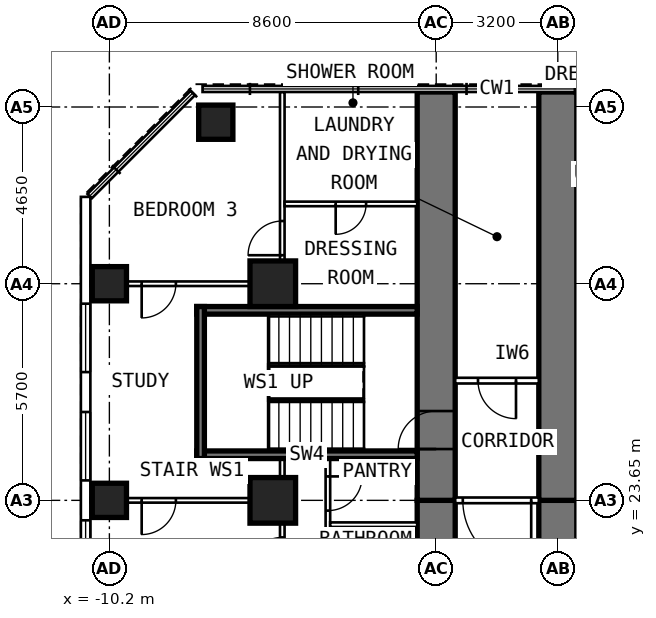
"""IFC4 building model, lengths in metres.
Left out: names, types, materials, properties, quantities, classifications, styles, units other than length and angle.
Written with IfcOpenShell. Run it as: python <this file> out.ifc"""

import sys

from ifc_helpers import new_model, si_unit, direction, frame, frame_2d, origin, origin_2d, place, context, subcontext, project, spatial, rectangle, extrude, element, fill, save


model = new_model("IFC4")
c1 = context("Model", 3, precision=1e-05, world=origin(), true_north=direction((0.0, 1.0)))
c2 = subcontext(c1, "Body", "Model", "MODEL_VIEW")
j1 = project(units=[si_unit("LENGTHUNIT", "METRE"), si_unit("PLANEANGLEUNIT", "RADIAN")], contexts=[c1])
p1 = place(None, origin())
s1 = spatial("IfcSite", under=j1, at=p1, CompositionType="ELEMENT")
p2 = place(p1, origin())
s2 = spatial("IfcBuilding", under=s1, at=p2, CompositionType="ELEMENT")
p3 = place(p2, frame((0.0, 0.0, 91.6)))
s3 = spatial("IfcBuildingStorey", under=s2, at=p3, CompositionType="ELEMENT", Elevation=91.6)
for number, where, z_axis, x_axis in (
    (1, (-10.2, 23.65, 0.0), (0.0, 0.0, 1.0), (0.0, 1.0, 0.0)),
    (2, (-10.2, 29.35, 0.0), (0.0, 0.0, 1.0), (0.0, 1.0, 0.0)),
    (3, (-7.4, 33.6, 0.0), (0.0, 0.0, 1.0), (0.0, 1.0, 0.0)),
):
    element("IfcColumn", number, at=place(p3, frame(where, z_axis=z_axis, x_axis=x_axis)), inside=s3, PredefinedType="COLUMN", context=c2, shape_type="SweptSolid", body=[
        extrude(rectangle(XDim=0.9, YDim=0.9, at=origin_2d()), origin(), (0.0, 0.0, 1.0), 3.6),
    ])
for number, where, z_axis, x_axis in (
    (4, (-5.9, 23.65, 0.0), (0.0, 0.0, 1.0), (0.0, 1.0, 0.0)),
    (5, (-5.9, 29.35, 0.0), (0.0, 0.0, 1.0), (0.0, 1.0, 0.0)),
):
    element("IfcColumn", number, at=place(p3, frame(where, z_axis=z_axis, x_axis=x_axis)), inside=s3, PredefinedType="COLUMN", context=c2, shape_type="SweptSolid", body=[
        extrude(rectangle(XDim=1.2, YDim=1.2, at=origin_2d()), origin(), (0.0, 0.0, 1.0), 3.6),
    ])
p4 = place(p3, frame((-1.6, 17.95, 0.0), z_axis=(0.0, 0.0, 1.0), x_axis=(0.0, 1.0, 0.0)))
e6 = element("IfcWall", 6, at=p4, inside=s3, PredefinedType="SHEAR", context=c2, shape_type="SweptSolid", body=[
    extrude(rectangle(XDim=5.7, YDim=1.0, at=frame_2d((2.85, 0.0))), origin(), (0.0, 0.0, 1.0), 3.6),
])
p5 = place(p4, frame((0.9, 0.0, 0.0)))
e7 = element("IfcOpeningElement", 7, at=p5, cuts=e6, PredefinedType="OPENING", context=c2, shape_type="SweptSolid", body=[
    extrude(rectangle(XDim=1.0, YDim=2.1, at=frame_2d((0.5, 1.05))), frame((0.0, 0.512, 0.0), z_axis=(0.0, -1.0, 0.0), x_axis=(1.0, 0.0, 0.0)), (0.0, 0.0, 1.0), 1.024),
])
p6 = place(p3, frame((-1.6, 23.65, 0.0), z_axis=(0.0, 0.0, 1.0), x_axis=(0.0, 1.0, 0.0)))
e8 = element("IfcWall", 8, at=p6, inside=s3, PredefinedType="SHEAR", context=c2, shape_type="SweptSolid", body=[
    extrude(rectangle(XDim=10.745, YDim=1.0, at=frame_2d((5.373, 0.0))), origin(), (0.0, 0.0, 1.0), 3.6),
])
p7 = place(p6, frame((1.35, 0.0, 0.0)))
e9 = element("IfcOpeningElement", 9, at=p7, cuts=e8, PredefinedType="OPENING", context=c2, shape_type="SweptSolid", body=[
    extrude(rectangle(XDim=1.0, YDim=2.1, at=frame_2d((0.5, 1.05))), frame((0.0, 0.512, 0.0), z_axis=(0.0, -1.0, 0.0), x_axis=(1.0, 0.0, 0.0)), (0.0, 0.0, 1.0), 1.024),
])
p8 = place(p3, frame((1.6, 17.95, 0.0), z_axis=(0.0, 0.0, 1.0), x_axis=(0.0, 1.0, 0.0)))
e10 = element("IfcWall", 10, at=p8, inside=s3, PredefinedType="SHEAR", context=c2, shape_type="SweptSolid", body=[
    extrude(rectangle(XDim=5.7, YDim=1.0, at=frame_2d((2.85, 0.0))), origin(), (0.0, 0.0, 1.0), 3.6),
])
p9 = place(p8, frame((0.9, 0.0, 0.0)))
e11 = element("IfcOpeningElement", 11, at=p9, cuts=e10, PredefinedType="OPENING", context=c2, shape_type="SweptSolid", body=[
    extrude(rectangle(XDim=1.0, YDim=2.1, at=frame_2d((0.5, 1.05))), frame((0.0, 0.512, 0.0), z_axis=(0.0, -1.0, 0.0), x_axis=(1.0, 0.0, 0.0)), (0.0, 0.0, 1.0), 1.024),
])
p10 = place(p3, frame((1.6, 23.65, 0.0), z_axis=(0.0, 0.0, 1.0), x_axis=(0.0, 1.0, 0.0)))
e12 = element("IfcWall", 12, at=p10, inside=s3, PredefinedType="SHEAR", context=c2, shape_type="SweptSolid", body=[
    extrude(rectangle(XDim=10.745, YDim=1.0, at=frame_2d((5.373, 0.0))), origin(), (0.0, 0.0, 1.0), 3.6),
])
p11 = place(p3, frame((-10.825, 6.148, 0.0), z_axis=(0.0, 0.0, 1.0), x_axis=(0.0, 1.0, 0.0)))
e13 = element("IfcWall", 13, at=p11, inside=s3, PredefinedType="SOLIDWALL", context=c2, shape_type="SweptSolid", body=[
    extrude(rectangle(XDim=25.487, YDim=0.25, at=frame_2d((12.744, 0.0))), origin(), (0.0, 0.0, 1.0), 3.35),
])
p12 = place(p11, frame((0.927, 0.0, 0.8)))
e14 = element("IfcOpeningElement", 14, at=p12, cuts=e13, PredefinedType="OPENING", context=c2, shape_type="SweptSolid", body=[
    extrude(rectangle(XDim=1.8, YDim=1.8, at=frame_2d((0.9, 0.9))), frame((0.0, 0.137, 0.0), z_axis=(0.0, -1.0, 0.0), x_axis=(1.0, 0.0, 0.0)), (0.0, 0.0, 1.0), 0.274),
])
p13 = place(p11, frame((3.777, 0.0, 0.8)))
e15 = element("IfcOpeningElement", 15, at=p13, cuts=e13, PredefinedType="OPENING", context=c2, shape_type="SweptSolid", body=[
    extrude(rectangle(XDim=1.8, YDim=1.8, at=frame_2d((0.9, 0.9))), frame((0.0, 0.137, 0.0), z_axis=(0.0, -1.0, 0.0), x_axis=(1.0, 0.0, 0.0)), (0.0, 0.0, 1.0), 0.274),
])
p14 = place(p11, frame((6.627, 0.0, 0.8)))
e16 = element("IfcOpeningElement", 16, at=p14, cuts=e13, PredefinedType="OPENING", context=c2, shape_type="SweptSolid", body=[
    extrude(rectangle(XDim=1.8, YDim=1.8, at=frame_2d((0.9, 0.9))), frame((0.0, 0.137, 0.0), z_axis=(0.0, -1.0, 0.0), x_axis=(1.0, 0.0, 0.0)), (0.0, 0.0, 1.0), 0.274),
])
p15 = place(p11, frame((9.477, 0.0, 0.8)))
e17 = element("IfcOpeningElement", 17, at=p15, cuts=e13, PredefinedType="OPENING", context=c2, shape_type="SweptSolid", body=[
    extrude(rectangle(XDim=1.8, YDim=1.8, at=frame_2d((0.9, 0.9))), frame((0.0, 0.137, 0.0), z_axis=(0.0, -1.0, 0.0), x_axis=(1.0, 0.0, 0.0)), (0.0, 0.0, 1.0), 0.274),
])
p16 = place(p11, frame((12.327, 0.0, 0.8)))
e18 = element("IfcOpeningElement", 18, at=p16, cuts=e13, PredefinedType="OPENING", context=c2, shape_type="SweptSolid", body=[
    extrude(rectangle(XDim=1.8, YDim=1.8, at=frame_2d((0.9, 0.9))), frame((0.0, 0.137, 0.0), z_axis=(0.0, -1.0, 0.0), x_axis=(1.0, 0.0, 0.0)), (0.0, 0.0, 1.0), 0.274),
])
p17 = place(p11, frame((15.177, 0.0, 0.8)))
e19 = element("IfcOpeningElement", 19, at=p17, cuts=e13, PredefinedType="OPENING", context=c2, shape_type="SweptSolid", body=[
    extrude(rectangle(XDim=1.8, YDim=1.8, at=frame_2d((0.9, 0.9))), frame((0.0, 0.137, 0.0), z_axis=(0.0, -1.0, 0.0), x_axis=(1.0, 0.0, 0.0)), (0.0, 0.0, 1.0), 0.274),
])
p18 = place(p11, frame((18.027, 0.0, 0.8)))
e20 = element("IfcOpeningElement", 20, at=p18, cuts=e13, PredefinedType="OPENING", context=c2, shape_type="SweptSolid", body=[
    extrude(rectangle(XDim=1.8, YDim=1.8, at=frame_2d((0.9, 0.9))), frame((0.0, 0.137, 0.0), z_axis=(0.0, -1.0, 0.0), x_axis=(1.0, 0.0, 0.0)), (0.0, 0.0, 1.0), 0.274),
])
p19 = place(p11, frame((20.877, 0.0, 0.8)))
e21 = element("IfcOpeningElement", 21, at=p19, cuts=e13, PredefinedType="OPENING", context=c2, shape_type="SweptSolid", body=[
    extrude(rectangle(XDim=1.8, YDim=1.8, at=frame_2d((0.9, 0.9))), frame((0.0, 0.137, 0.0), z_axis=(0.0, -1.0, 0.0), x_axis=(1.0, 0.0, 0.0)), (0.0, 0.0, 1.0), 0.274),
])
p20 = place(p3, frame((-4.45, 15.2, 0.0), z_axis=(0.0, 0.0, 1.0), x_axis=(0.0, 1.0, 0.0)))
e22 = element("IfcWall", 22, at=p20, inside=s3, PredefinedType="PARTITIONING", context=c2, shape_type="SweptSolid", body=[
    extrude(rectangle(XDim=9.55, YDim=0.12, at=frame_2d((4.775, 0.0))), origin(), (0.0, 0.0, 1.0), 3.35),
])
p21 = place(p20, frame((0.312, 0.0, 0.0)))
e23 = element("IfcOpeningElement", 23, at=p21, cuts=e22, PredefinedType="OPENING", context=c2, shape_type="SweptSolid", body=[
    extrude(rectangle(XDim=0.8, YDim=2.1, at=frame_2d((0.4, 1.05))), frame((0.0, 0.072, 0.0), z_axis=(0.0, -1.0, 0.0), x_axis=(1.0, 0.0, 0.0)), (0.0, 0.0, 1.0), 0.144),
])
p22 = place(p20, frame((1.938, 0.0, 0.0)))
e24 = element("IfcOpeningElement", 24, at=p22, cuts=e22, PredefinedType="OPENING", context=c2, shape_type="SweptSolid", body=[
    extrude(rectangle(XDim=0.8, YDim=2.1, at=frame_2d((0.4, 1.05))), frame((0.0, 0.072, 0.0), z_axis=(0.0, -1.0, 0.0), x_axis=(1.0, 0.0, 0.0)), (0.0, 0.0, 1.0), 0.144),
])
p23 = place(p20, frame((3.8, 0.0, 0.0)))
e25 = element("IfcOpeningElement", 25, at=p23, cuts=e22, PredefinedType="OPENING", context=c2, shape_type="SweptSolid", body=[
    extrude(rectangle(XDim=0.9, YDim=2.1, at=frame_2d((0.45, 1.05))), frame((0.0, 0.072, 0.0), z_axis=(0.0, -1.0, 0.0), x_axis=(1.0, 0.0, 0.0)), (0.0, 0.0, 1.0), 0.144),
])
p24 = place(p20, frame((6.18, 0.0, 0.0)))
e26 = element("IfcOpeningElement", 26, at=p24, cuts=e22, PredefinedType="OPENING", context=c2, shape_type="SweptSolid", body=[
    extrude(rectangle(XDim=0.8, YDim=2.1, at=frame_2d((0.4, 1.05))), frame((0.0, 0.072, 0.0), z_axis=(0.0, -1.0, 0.0), x_axis=(1.0, 0.0, 0.0)), (0.0, 0.0, 1.0), 0.144),
])
p25 = place(p20, frame((8.18, 0.0, 0.0)))
e27 = element("IfcOpeningElement", 27, at=p25, cuts=e22, PredefinedType="OPENING", context=c2, shape_type="SweptSolid", body=[
    extrude(rectangle(XDim=0.9, YDim=2.1, at=frame_2d((0.45, 1.05))), frame((0.0, 0.072, 0.0), z_axis=(0.0, -1.0, 0.0), x_axis=(1.0, 0.0, 0.0)), (0.0, 0.0, 1.0), 0.144),
])
p26 = place(p3, frame((-5.65, 15.2, 0.0), z_axis=(0.0, 0.0, 1.0), x_axis=(0.0, 1.0, 0.0)))
e28 = element("IfcWall", 28, at=p26, inside=s3, PredefinedType="PARTITIONING", context=c2, shape_type="SweptSolid", body=[
    extrude(rectangle(XDim=9.55, YDim=0.12, at=frame_2d((4.775, 0.0))), origin(), (0.0, 0.0, 1.0), 3.35),
])
p27 = place(p26, frame((0.875, 0.0, 0.0)))
e29 = element("IfcOpeningElement", 29, at=p27, cuts=e28, PredefinedType="OPENING", context=c2, shape_type="SweptSolid", body=[
    extrude(rectangle(XDim=0.9, YDim=2.1, at=frame_2d((0.45, 1.05))), frame((0.0, 0.072, 0.0), z_axis=(0.0, -1.0, 0.0), x_axis=(1.0, 0.0, 0.0)), (0.0, 0.0, 1.0), 0.144),
])
p28 = place(p26, frame((3.725, 0.0, 0.0)))
e30 = element("IfcOpeningElement", 30, at=p28, cuts=e28, PredefinedType="OPENING", context=c2, shape_type="SweptSolid", body=[
    extrude(rectangle(XDim=0.9, YDim=2.1, at=frame_2d((0.45, 1.05))), frame((0.0, 0.072, 0.0), z_axis=(0.0, -1.0, 0.0), x_axis=(1.0, 0.0, 0.0)), (0.0, 0.0, 1.0), 0.144),
])
p29 = place(p26, frame((6.575, 0.0, 0.0)))
e31 = element("IfcOpeningElement", 31, at=p29, cuts=e28, PredefinedType="OPENING", context=c2, shape_type="SweptSolid", body=[
    extrude(rectangle(XDim=0.9, YDim=2.1, at=frame_2d((0.45, 1.05))), frame((0.0, 0.072, 0.0), z_axis=(0.0, -1.0, 0.0), x_axis=(1.0, 0.0, 0.0)), (0.0, 0.0, 1.0), 0.144),
])
p30 = place(p3, frame((-2.1, 23.01, 0.0), z_axis=(0.0, 0.0, 1.0), x_axis=(-1.0, 0.0, 0.0)))
e32 = element("IfcWall", 32, at=p30, inside=s3, PredefinedType="PARTITIONING", context=c2, shape_type="SweptSolid", body=[
    extrude(rectangle(XDim=2.29, YDim=0.12, at=frame_2d((1.145, 0.0))), origin(), (0.0, 0.0, 1.0), 3.35),
])
p31 = place(p3, frame((-5.71, 23.65, 0.0), z_axis=(0.0, 0.0, 1.0), x_axis=(-1.0, 0.0, 0.0)))
e33 = element("IfcWall", 33, at=p31, inside=s3, PredefinedType="PARTITIONING", context=c2, shape_type="SweptSolid", body=[
    extrude(rectangle(XDim=4.99, YDim=0.12, at=frame_2d((2.495, 0.0))), origin(), (0.0, 0.0, 1.0), 2.45),
])
p32 = place(p31, frame((2.74, 0.0, 0.0)))
e34 = element("IfcOpeningElement", 34, at=p32, cuts=e33, PredefinedType="OPENING", context=c2, shape_type="SweptSolid", body=[
    extrude(rectangle(XDim=0.9, YDim=2.1, at=frame_2d((0.45, 1.05))), frame((0.0, 0.072, 0.0), z_axis=(0.0, -1.0, 0.0), x_axis=(1.0, 0.0, 0.0)), (0.0, 0.0, 1.0), 0.144),
])
p33 = place(p3, frame((-5.71, 29.35, 0.0), z_axis=(0.0, 0.0, 1.0), x_axis=(-1.0, 0.0, 0.0)))
e35 = element("IfcWall", 35, at=p33, inside=s3, PredefinedType="PARTITIONING", context=c2, shape_type="SweptSolid", body=[
    extrude(rectangle(XDim=4.99, YDim=0.12, at=frame_2d((2.495, 0.0))), origin(), (0.0, 0.0, 1.0), 2.45),
])
p34 = place(p33, frame((2.74, 0.0, 0.0)))
e36 = element("IfcOpeningElement", 36, at=p34, cuts=e35, PredefinedType="OPENING", context=c2, shape_type="SweptSolid", body=[
    extrude(rectangle(XDim=0.9, YDim=2.1, at=frame_2d((0.45, 1.05))), frame((0.0, 0.072, 0.0), z_axis=(0.0, -1.0, 0.0), x_axis=(1.0, 0.0, 0.0)), (0.0, 0.0, 1.0), 0.144),
])
p35 = place(p3, frame((-5.65, 28.95, 0.0), z_axis=(0.0, 0.0, 1.0), x_axis=(0.0, 1.0, 0.0)))
e37 = element("IfcWall", 37, at=p35, inside=s3, PredefinedType="PARTITIONING", context=c2, shape_type="SweptSolid", body=[
    extrude(rectangle(XDim=5.445, YDim=0.12, at=frame_2d((2.723, 0.0))), origin(), (0.0, 0.0, 1.0), 3.35),
])
p36 = place(p35, frame((1.15, 0.0, 0.0)))
e38 = element("IfcOpeningElement", 38, at=p36, cuts=e37, PredefinedType="OPENING", context=c2, shape_type="SweptSolid", body=[
    extrude(rectangle(XDim=0.9, YDim=2.1, at=frame_2d((0.45, 1.05))), frame((0.0, 0.072, 0.0), z_axis=(0.0, -1.0, 0.0), x_axis=(1.0, 0.0, 0.0)), (0.0, 0.0, 1.0), 0.144),
])
p37 = place(p3, frame((-2.1, 31.45, 0.0), z_axis=(0.0, 0.0, 1.0), x_axis=(-1.0, 0.0, 0.0)))
e39 = element("IfcWall", 39, at=p37, inside=s3, PredefinedType="PARTITIONING", context=c2, shape_type="SweptSolid", body=[
    extrude(rectangle(XDim=3.49, YDim=0.12, at=frame_2d((1.745, 0.0))), origin(), (0.0, 0.0, 1.0), 3.35),
])
p38 = place(p37, frame((1.345, 0.0, 0.0)))
e40 = element("IfcOpeningElement", 40, at=p38, cuts=e39, PredefinedType="OPENING", context=c2, shape_type="SweptSolid", body=[
    extrude(rectangle(XDim=0.8, YDim=2.1, at=frame_2d((0.4, 1.05))), frame((0.0, 0.072, 0.0), z_axis=(0.0, -1.0, 0.0), x_axis=(1.0, 0.0, 0.0)), (0.0, 0.0, 1.0), 0.144),
])
p39 = place(p3, frame((1.1, 26.8, 0.0), z_axis=(0.0, 0.0, 1.0), x_axis=(-1.0, 0.0, 0.0)))
e41 = element("IfcWall", 41, at=p39, inside=s3, PredefinedType="PARTITIONING", context=c2, shape_type="SweptSolid", body=[
    extrude(rectangle(XDim=2.2, YDim=0.15, at=frame_2d((1.1, 0.0))), origin(), (0.0, 0.0, 1.0), 3.35),
])
p40 = place(p39, frame((0.6, 0.0, 0.0)))
e42 = element("IfcOpeningElement", 42, at=p40, cuts=e41, PredefinedType="OPENING", context=c2, shape_type="SweptSolid", body=[
    extrude(rectangle(XDim=1.0, YDim=2.1, at=frame_2d((0.5, 1.05))), frame((0.0, 0.087, 0.0), z_axis=(0.0, -1.0, 0.0), x_axis=(1.0, 0.0, 0.0)), (0.0, 0.0, 1.0), 0.174),
])
p41 = place(p3, frame((1.1, 23.65, 0.0), z_axis=(0.0, 0.0, 1.0), x_axis=(-1.0, 0.0, 0.0)))
e43 = element("IfcWall", 43, at=p41, inside=s3, PredefinedType="PARTITIONING", context=c2, shape_type="SweptSolid", body=[
    extrude(rectangle(XDim=2.2, YDim=0.15, at=frame_2d((1.1, 0.0))), origin(), (0.0, 0.0, 1.0), 3.35),
])
p42 = place(p41, frame((0.2, 0.0, 0.0)))
e44 = element("IfcOpeningElement", 44, at=p42, cuts=e43, PredefinedType="OPENING", context=c2, shape_type="SweptSolid", body=[
    extrude(rectangle(XDim=1.8, YDim=2.1, at=frame_2d((0.9, 1.05))), frame((0.0, 0.087, 0.0), z_axis=(0.0, -1.0, 0.0), x_axis=(1.0, 0.0, 0.0)), (0.0, 0.0, 1.0), 0.174),
])
for number, where, z_axis, x_axis in (
    (45, (-2.1, 24.85, 0.0), (0.0, 0.0, 1.0), (-1.0, 0.0, 0.0)),
    (46, (-2.1, 28.65, 0.0), (0.0, 0.0, 1.0), (-1.0, 0.0, 0.0)),
):
    element("IfcWall", number, at=place(p3, frame(where, z_axis=z_axis, x_axis=x_axis)), inside=s3, PredefinedType="SHEAR", context=c2, shape_type="SweptSolid", body=[
        extrude(rectangle(XDim=5.8, YDim=0.2, at=frame_2d((2.9, 0.0))), origin(), (0.0, 0.0, 1.0), 3.33),
    ])
p43 = place(p3, frame((-7.8, 24.75, 0.0), z_axis=(0.0, 0.0, 1.0), x_axis=(0.0, 1.0, 0.0)))
e47 = element("IfcWall", 47, at=p43, inside=s3, PredefinedType="SHEAR", context=c2, shape_type="SweptSolid", body=[
    extrude(rectangle(XDim=4.0, YDim=0.2, at=frame_2d((2.0, 0.0))), origin(), (0.0, 0.0, 1.0), 3.33),
])
p44 = place(p17, origin())
e48 = element("IfcWindow", 48, at=p44, inside=s3, PartitioningType="SINGLE_PANEL", PredefinedType="WINDOW", context=c2, shape_type="SweptSolid", body=[
    extrude(rectangle(XDim=1.8, YDim=1.8, at=frame_2d((0.9, 0.9))), frame((0.0, 0.03, 0.0), z_axis=(0.0, -1.0, 0.0), x_axis=(1.0, 0.0, 0.0)), (0.0, 0.0, 1.0), 0.06),
])
fill(e19, e48)
p45 = place(p18, origin())
e49 = element("IfcWindow", 49, at=p45, inside=s3, PartitioningType="SINGLE_PANEL", PredefinedType="WINDOW", context=c2, shape_type="SweptSolid", body=[
    extrude(rectangle(XDim=1.8, YDim=1.8, at=frame_2d((0.9, 0.9))), frame((0.0, 0.03, 0.0), z_axis=(0.0, -1.0, 0.0), x_axis=(1.0, 0.0, 0.0)), (0.0, 0.0, 1.0), 0.06),
])
fill(e20, e49)
p46 = place(p19, origin())
e50 = element("IfcWindow", 50, at=p46, inside=s3, PartitioningType="SINGLE_PANEL", PredefinedType="WINDOW", context=c2, shape_type="SweptSolid", body=[
    extrude(rectangle(XDim=1.8, YDim=1.8, at=frame_2d((0.9, 0.9))), frame((0.0, 0.03, 0.0), z_axis=(0.0, -1.0, 0.0), x_axis=(1.0, 0.0, 0.0)), (0.0, 0.0, 1.0), 0.06),
])
fill(e21, e50)
p47 = place(p29, origin())
e51 = element("IfcDoor", 51, at=p47, inside=s3, OperationType="SINGLE_SWING_LEFT", PredefinedType="DOOR", context=c2, shape_type="SweptSolid", body=[
    extrude(rectangle(XDim=0.9, YDim=2.1, at=frame_2d((0.45, 1.05))), frame((0.0, 0.025, 0.0), z_axis=(0.0, -1.0, 0.0), x_axis=(1.0, 0.0, 0.0)), (0.0, 0.0, 1.0), 0.05),
])
fill(e31, e51)
p48 = place(p25, frame((0.9, 0.0, 0.0), z_axis=(0.0, 0.0, 1.0), x_axis=(-1.0, 0.0, 0.0)))
e52 = element("IfcDoor", 52, at=p48, inside=s3, OperationType="SINGLE_SWING_LEFT", PredefinedType="DOOR", context=c2, shape_type="SweptSolid", body=[
    extrude(rectangle(XDim=0.9, YDim=2.1, at=frame_2d((0.45, 1.05))), frame((0.0, 0.025, 0.0), z_axis=(0.0, -1.0, 0.0), x_axis=(1.0, 0.0, 0.0)), (0.0, 0.0, 1.0), 0.05),
])
fill(e27, e52)
p49 = place(p34, origin())
e53 = element("IfcDoor", 53, at=p49, inside=s3, OperationType="SINGLE_SWING_RIGHT", PredefinedType="DOOR", context=c2, shape_type="SweptSolid", body=[
    extrude(rectangle(XDim=0.9, YDim=2.1, at=frame_2d((0.45, 1.05))), frame((0.0, 0.025, 0.0), z_axis=(0.0, -1.0, 0.0), x_axis=(1.0, 0.0, 0.0)), (0.0, 0.0, 1.0), 0.05),
])
fill(e36, e53)
p50 = place(p36, origin())
e54 = element("IfcDoor", 54, at=p50, inside=s3, OperationType="SINGLE_SWING_LEFT", PredefinedType="DOOR", context=c2, shape_type="SweptSolid", body=[
    extrude(rectangle(XDim=0.9, YDim=2.1, at=frame_2d((0.45, 1.05))), frame((0.0, 0.025, 0.0), z_axis=(0.0, -1.0, 0.0), x_axis=(1.0, 0.0, 0.0)), (0.0, 0.0, 1.0), 0.05),
])
fill(e38, e54)
p51 = place(p38, origin())
e55 = element("IfcDoor", 55, at=p51, inside=s3, OperationType="SINGLE_SWING_RIGHT", PredefinedType="DOOR", context=c2, shape_type="SweptSolid", body=[
    extrude(rectangle(XDim=0.8, YDim=2.1, at=frame_2d((0.4, 1.05))), frame((0.0, 0.025, 0.0), z_axis=(0.0, -1.0, 0.0), x_axis=(1.0, 0.0, 0.0)), (0.0, 0.0, 1.0), 0.05),
])
fill(e40, e55)
p52 = place(p32, origin())
e56 = element("IfcDoor", 56, at=p52, inside=s3, OperationType="SINGLE_SWING_RIGHT", PredefinedType="DOOR", context=c2, shape_type="SweptSolid", body=[
    extrude(rectangle(XDim=0.9, YDim=2.1, at=frame_2d((0.45, 1.05))), frame((0.0, 0.025, 0.0), z_axis=(0.0, -1.0, 0.0), x_axis=(1.0, 0.0, 0.0)), (0.0, 0.0, 1.0), 0.05),
])
fill(e34, e56)
p53 = place(p40, origin())
e57 = element("IfcDoor", 57, at=p53, inside=s3, OperationType="SINGLE_SWING_LEFT", PredefinedType="DOOR", context=c2, shape_type="SweptSolid", body=[
    extrude(rectangle(XDim=1.0, YDim=2.1, at=frame_2d((0.5, 1.05))), frame((0.0, 0.025, 0.0), z_axis=(0.0, -1.0, 0.0), x_axis=(1.0, 0.0, 0.0)), (0.0, 0.0, 1.0), 0.05),
])
fill(e42, e57)
p54 = place(p42, origin())
e58 = element("IfcDoor", 58, at=p54, inside=s3, OperationType="DOUBLE_DOOR_DOUBLE_SWING", PredefinedType="DOOR", context=c2, shape_type="SweptSolid", body=[
    extrude(rectangle(XDim=1.8, YDim=2.1, at=frame_2d((0.9, 1.05))), frame((0.0, 0.025, 0.0), z_axis=(0.0, -1.0, 0.0), x_axis=(1.0, 0.0, 0.0)), (0.0, 0.0, 1.0), 0.05),
])
fill(e44, e58)
p55 = place(p7, origin())
e59 = element("IfcDoor", 59, at=p55, inside=s3, OperationType="SINGLE_SWING_LEFT", PredefinedType="DOOR", context=c2, shape_type="SweptSolid", body=[
    extrude(rectangle(XDim=1.0, YDim=2.1, at=frame_2d((0.5, 1.05))), frame((0.0, 0.25, 0.0), z_axis=(0.0, -1.0, 0.0), x_axis=(1.0, 0.0, 0.0)), (0.0, 0.0, 1.0), 0.5),
])
fill(e9, e59)
save(model, sys.argv[1])
